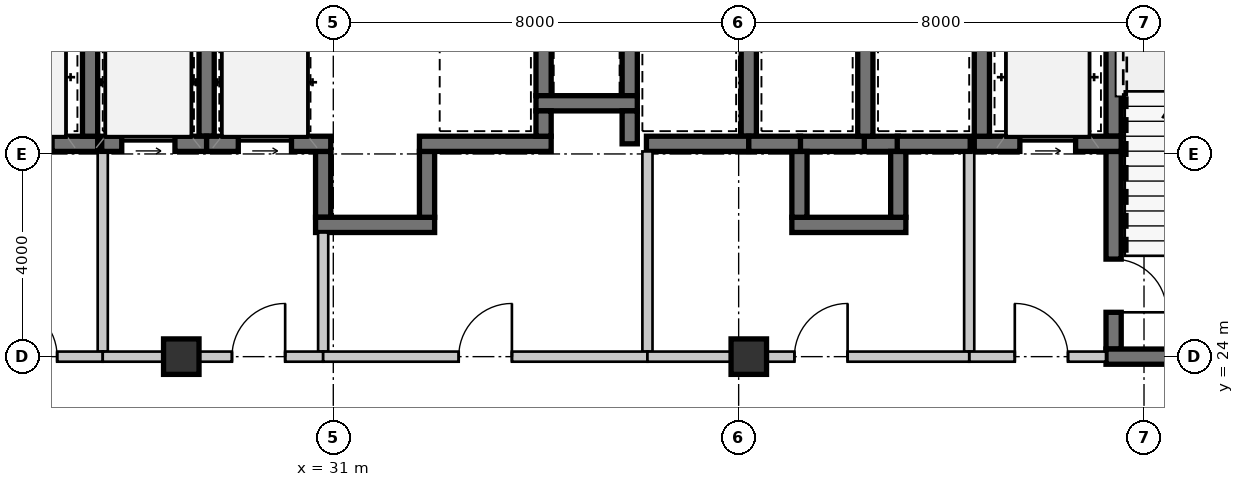
"""IFC4 building model, lengths in metres.
Left out: names, types, materials, properties, quantities, classifications, styles, units other than length and angle.
Written with IfcOpenShell. Run it as: python <this file> out.ifc"""

import sys

from ifc_helpers import new_model, si_unit, direction, frame, frame_2d, origin, origin_2d, place, context, subcontext, project, spatial, rectangle, extrude, source, transform, mapped, element, fill, save


model = new_model("IFC4")
c1 = context("Model", 3, precision=1e-05, world=origin(), true_north=direction((0.0, 1.0)))
c2 = subcontext(c1, "Body", "Model", "MODEL_VIEW")
j1 = project(units=[si_unit("LENGTHUNIT", "METRE"), si_unit("PLANEANGLEUNIT", "RADIAN")], contexts=[c1])
p1 = place(None, origin())
s1 = spatial("IfcSite", under=j1, at=p1, CompositionType="ELEMENT")
p2 = place(p1, origin())
s2 = spatial("IfcBuilding", under=s1, at=p2, CompositionType="ELEMENT")
p3 = place(p2, frame((0.0, 0.0, 68.25)))
s3 = spatial("IfcBuildingStorey", under=s2, at=p3, CompositionType="ELEMENT", Elevation=68.25)
m1 = source(origin(), c2, "Body", "SweptSolid", [
    extrude(rectangle(XDim=0.7, YDim=0.7, at=origin_2d()), origin(), (0.0, 0.0, 1.0), 3.15),
])
for number, where, z_axis, x_axis in (
    (1, (28.0, 24.0, 0.0), (0.0, 0.0, 1.0), (1.0, 0.0, 0.0)),
    (2, (39.2, 24.0, 0.0), (0.0, 0.0, 1.0), (1.0, 0.0, 0.0)),
):
    element("IfcColumn", number, at=place(p3, frame(where, z_axis=z_axis, x_axis=x_axis)), inside=s3, PredefinedType="COLUMN", context=c2, shape_type="MappedRepresentation", body=[
        mapped(m1, transform((0.0, 0.0, 0.0), scale=1.0)),
    ])
m2 = source(origin(), c2, "Body", "SweptSolid", [
    extrude(rectangle(XDim=2.9, YDim=0.3, at=frame_2d((1.45, 0.0))), origin(), (0.0, 0.0, 1.0), 2.93),
])
p4 = place(p3, frame((23.45, 28.2, 0.0), z_axis=(0.0, 0.0, 1.0), x_axis=(1.0, 0.0, 0.0)))
e3 = element("IfcWall", 3, at=p4, inside=s3, PredefinedType="SHEAR", context=c2, shape_type="MappedRepresentation", body=[
    mapped(m2, transform((0.0, 0.0, 0.0), scale=1.0)),
])
m3 = source(origin(), c2, "Body", "SweptSolid", [
    extrude(rectangle(XDim=1.1, YDim=2.15, at=frame_2d((0.55, 1.075))), frame((0.0, 0.16, 0.0), z_axis=(0.0, -1.0, 0.0), x_axis=(1.0, 0.0, 0.0)), (0.0, 0.0, 1.0), 0.32),
])
p5 = place(p4, frame((0.9, 0.0, 0.0)))
e4 = element("IfcOpeningElement", 4, at=p5, cuts=e3, PredefinedType="OPENING", context=c2, shape_type="MappedRepresentation", body=[
    mapped(m3, transform((0.0, 0.0, 0.0), scale=1.0)),
])
m4 = source(origin(), c2, "Body", "SweptSolid", [
    extrude(rectangle(XDim=3.5, YDim=0.3, at=frame_2d((1.75, 0.0))), origin(), (0.0, 0.0, 1.0), 2.93),
])
p6 = place(p3, frame((26.2, 28.35, 0.0), z_axis=(0.0, 0.0, 1.0), x_axis=(0.0, 1.0, 0.0)))
e5 = element("IfcWall", 5, at=p6, inside=s3, PredefinedType="SHEAR", context=c2, shape_type="MappedRepresentation", body=[
    mapped(m4, transform((0.0, 0.0, 0.0), scale=1.0)),
])
m5 = source(origin(), c2, "Body", "SweptSolid", [
    extrude(rectangle(XDim=3.95, YDim=0.2, at=frame_2d((1.975, 0.0))), origin(), (0.0, 0.0, 1.0), 2.93),
])
p7 = place(p3, frame((26.45, 24.1, 0.0), z_axis=(0.0, 0.0, 1.0), x_axis=(0.0, 1.0, 0.0)))
e6 = element("IfcWall", 6, at=p7, inside=s3, PredefinedType="SOLIDWALL", context=c2, shape_type="MappedRepresentation", body=[
    mapped(m5, transform((0.0, 0.0, 0.0), scale=1.0)),
])
m6 = source(origin(), c2, "Body", "SweptSolid", [
    extrude(rectangle(XDim=2.7, YDim=0.2, at=frame_2d((1.35, 0.0))), origin(), (0.0, 0.0, 1.0), 2.47),
])
p8 = place(p3, frame((23.75, 24.0, 0.0), z_axis=(0.0, 0.0, 1.0), x_axis=(1.0, 0.0, 0.0)))
e7 = element("IfcWall", 7, at=p8, inside=s3, PredefinedType="SOLIDWALL", context=c2, shape_type="MappedRepresentation", body=[
    mapped(m6, transform((0.0, 0.0, 0.0), scale=1.0)),
])
m7 = source(origin(), c2, "Body", "SweptSolid", [
    extrude(rectangle(XDim=1.05, YDim=2.1, at=frame_2d((0.525, 1.05))), frame((0.0, 0.11, 0.0), z_axis=(0.0, -1.0, 0.0), x_axis=(1.0, 0.0, 0.0)), (0.0, 0.0, 1.0), 0.22),
])
p9 = place(p8, frame((0.75, 0.0, 0.0)))
e8 = element("IfcOpeningElement", 8, at=p9, cuts=e7, PredefinedType="OPENING", context=c2, shape_type="MappedRepresentation", body=[
    mapped(m7, transform((0.0, 0.0, 0.0), scale=1.0)),
])
p10 = place(p3, frame((46.4, 31.85, 0.0), z_axis=(0.0, 0.0, 1.0), x_axis=(0.0, -1.0, 0.0)))
e9 = element("IfcWall", 9, at=p10, inside=s3, PredefinedType="SHEAR", context=c2, shape_type="MappedRepresentation", body=[
    mapped(m4, transform((0.0, 0.0, 0.0), scale=1.0)),
])
m8 = source(origin(), c2, "Body", "SweptSolid", [
    extrude(rectangle(XDim=3.9, YDim=0.3, at=frame_2d((1.95, 0.0))), origin(), (0.0, 0.0, 1.0), 2.93),
])
p11 = place(p3, frame((46.4, 28.05, 0.0), z_axis=(0.0, 0.0, 1.0), x_axis=(0.0, -1.0, 0.0)))
e10 = element("IfcWall", 10, at=p11, inside=s3, PredefinedType="SHEAR", context=c2, shape_type="MappedRepresentation", body=[
    mapped(m8, transform((0.0, 0.0, 0.0), scale=1.0)),
])
m9 = source(origin(), c2, "Body", "SweptSolid", [
    extrude(rectangle(XDim=1.05, YDim=2.1, at=frame_2d((0.525, 1.05))), frame((0.0, 0.16, 0.0), z_axis=(0.0, -1.0, 0.0), x_axis=(1.0, 0.0, 0.0)), (0.0, 0.0, 1.0), 0.32),
])
p12 = place(p11, frame((2.125, 0.0, 0.0)))
e11 = element("IfcOpeningElement", 11, at=p12, cuts=e10, PredefinedType="OPENING", context=c2, shape_type="MappedRepresentation", body=[
    mapped(m9, transform((0.0, 0.0, 0.0), scale=1.0)),
])
m10 = source(origin(), c2, "Body", "SweptSolid", [
    extrude(rectangle(XDim=4.9, YDim=0.3, at=frame_2d((2.45, 0.0))), origin(), (0.0, 0.0, 1.0), 2.93),
])
p13 = place(p3, frame((46.25, 24.0, 0.0), z_axis=(0.0, 0.0, 1.0), x_axis=(1.0, 0.0, 0.0)))
e12 = element("IfcWall", 12, at=p13, inside=s3, PredefinedType="SHEAR", context=c2, shape_type="MappedRepresentation", body=[
    mapped(m10, transform((0.0, 0.0, 0.0), scale=1.0)),
])
p14 = place(p3, frame((43.65, 28.2, 0.0), z_axis=(0.0, 0.0, 1.0), x_axis=(1.0, 0.0, 0.0)))
e13 = element("IfcWall", 13, at=p14, inside=s3, PredefinedType="SHEAR", context=c2, shape_type="MappedRepresentation", body=[
    mapped(m2, transform((0.0, 0.0, 0.0), scale=1.0)),
])
p15 = place(p14, frame((0.9, 0.0, 0.0)))
e14 = element("IfcOpeningElement", 14, at=p15, cuts=e13, PredefinedType="OPENING", context=c2, shape_type="MappedRepresentation", body=[
    mapped(m3, transform((0.0, 0.0, 0.0), scale=1.0)),
])
p16 = place(p3, frame((43.8, 31.85, 0.0), z_axis=(0.0, 0.0, 1.0), x_axis=(0.0, -1.0, 0.0)))
e15 = element("IfcWall", 15, at=p16, inside=s3, PredefinedType="SHEAR", context=c2, shape_type="MappedRepresentation", body=[
    mapped(m4, transform((0.0, 0.0, 0.0), scale=1.0)),
])
p17 = place(p3, frame((43.55, 28.05, 0.0), z_axis=(0.0, 0.0, 1.0), x_axis=(0.0, -1.0, 0.0)))
e16 = element("IfcWall", 16, at=p17, inside=s3, PredefinedType="SOLIDWALL", context=c2, shape_type="MappedRepresentation", body=[
    mapped(m5, transform((0.0, 0.0, 0.0), scale=1.0)),
])
m11 = source(origin(), c2, "Body", "SweptSolid", [
    extrude(rectangle(XDim=2.7, YDim=0.2, at=frame_2d((1.35, 0.0))), origin(), (0.0, 0.0, 1.0), 2.397),
])
p18 = place(p3, frame((43.55, 24.0, 0.0), z_axis=(0.0, 0.0, 1.0), x_axis=(1.0, 0.0, 0.0)))
e17 = element("IfcWall", 17, at=p18, inside=s3, PredefinedType="SOLIDWALL", context=c2, shape_type="MappedRepresentation", body=[
    mapped(m11, transform((0.0, 0.0, 0.0), scale=1.0)),
])
p19 = place(p18, frame((0.9, 0.0, 0.0)))
e18 = element("IfcOpeningElement", 18, at=p19, cuts=e17, PredefinedType="OPENING", context=c2, shape_type="MappedRepresentation", body=[
    mapped(m7, transform((0.0, 0.0, 0.0), scale=1.0)),
])
m12 = source(origin(), c2, "Body", "SweptSolid", [
    extrude(rectangle(XDim=1.2, YDim=0.3, at=frame_2d((0.6, 0.0))), origin(), (0.0, 0.0, 1.0), 2.93),
])
for number, where, z_axis, x_axis in (
    (19, (35.15, 30.35, 0.0), (0.0, 0.0, 1.0), (0.0, -1.0, 0.0)),
    (20, (36.85, 29.15, 0.0), (0.0, 0.0, 1.0), (0.0, 1.0, 0.0)),
):
    element("IfcWall", number, at=place(p3, frame(where, z_axis=z_axis, x_axis=x_axis)), inside=s3, PredefinedType="SHEAR", context=c2, shape_type="MappedRepresentation", body=[
        mapped(m12, transform((0.0, 0.0, 0.0), scale=1.0)),
    ])
m13 = source(origin(), c2, "Body", "SweptSolid", [
    extrude(rectangle(XDim=2.0, YDim=0.3, at=frame_2d((1.0, 0.0))), origin(), (0.0, 0.0, 1.0), 2.93),
])
p20 = place(p3, frame((35.0, 29.0, 0.0), z_axis=(0.0, 0.0, 1.0), x_axis=(1.0, 0.0, 0.0)))
e21 = element("IfcWall", 21, at=p20, inside=s3, PredefinedType="SHEAR", context=c2, shape_type="MappedRepresentation", body=[
    mapped(m13, transform((0.0, 0.0, 0.0), scale=1.0)),
])
m14 = source(origin(), c2, "Body", "SweptSolid", [
    extrude(rectangle(XDim=1.3, YDim=0.3, at=frame_2d((0.65, 0.0))), origin(), (0.0, 0.0, 1.0), 2.93),
])
p21 = place(p3, frame((30.8, 28.05, 0.0), z_axis=(0.0, 0.0, 1.0), x_axis=(0.0, -1.0, 0.0)))
e22 = element("IfcWall", 22, at=p21, inside=s3, PredefinedType="SHEAR", context=c2, shape_type="MappedRepresentation", body=[
    mapped(m14, transform((0.0, 0.0, 0.0), scale=1.0)),
])
m15 = source(origin(), c2, "Body", "SweptSolid", [
    extrude(rectangle(XDim=2.35, YDim=0.3, at=frame_2d((1.175, 0.0))), origin(), (0.0, 0.0, 1.0), 2.93),
])
p22 = place(p3, frame((30.65, 26.6, 0.0), z_axis=(0.0, 0.0, 1.0), x_axis=(1.0, 0.0, 0.0)))
e23 = element("IfcWall", 23, at=p22, inside=s3, PredefinedType="SHEAR", context=c2, shape_type="MappedRepresentation", body=[
    mapped(m15, transform((0.0, 0.0, 0.0), scale=1.0)),
])
p23 = place(p3, frame((32.85, 26.75, 0.0), z_axis=(0.0, 0.0, 1.0), x_axis=(0.0, 1.0, 0.0)))
e24 = element("IfcWall", 24, at=p23, inside=s3, PredefinedType="SHEAR", context=c2, shape_type="MappedRepresentation", body=[
    mapped(m14, transform((0.0, 0.0, 0.0), scale=1.0)),
])
m16 = source(origin(), c2, "Body", "SweptSolid", [
    extrude(rectangle(XDim=1.32, YDim=0.3, at=frame_2d((0.66, 0.0))), origin(), (0.0, 0.0, 1.0), 2.93),
])
p24 = place(p3, frame((41.52, 28.2, 0.0), z_axis=(0.0, 0.0, 1.0), x_axis=(-1.0, 0.0, 0.0)))
e25 = element("IfcWall", 25, at=p24, inside=s3, PredefinedType="SHEAR", context=c2, shape_type="MappedRepresentation", body=[
    mapped(m16, transform((0.0, 0.0, 0.0), scale=1.0)),
])
m17 = source(origin(), c2, "Body", "SweptSolid", [
    extrude(rectangle(XDim=0.67, YDim=0.3, at=frame_2d((0.335, 0.0))), origin(), (0.0, 0.0, 1.0), 2.93),
])
p25 = place(p3, frame((42.15, 28.2, 0.0), z_axis=(0.0, 0.0, 1.0), x_axis=(-1.0, 0.0, 0.0)))
e26 = element("IfcWall", 26, at=p25, inside=s3, PredefinedType="SHEAR", context=c2, shape_type="MappedRepresentation", body=[
    mapped(m17, transform((0.0, 0.0, 0.0), scale=1.0)),
])
m18 = source(origin(), c2, "Body", "SweptSolid", [
    extrude(rectangle(XDim=2.25, YDim=0.3, at=frame_2d((1.125, 0.0))), origin(), (0.0, 0.0, 1.0), 2.93),
])
p26 = place(p3, frame((40.05, 26.6, 0.0), z_axis=(0.0, 0.0, 1.0), x_axis=(1.0, 0.0, 0.0)))
e27 = element("IfcWall", 27, at=p26, inside=s3, PredefinedType="SHEAR", context=c2, shape_type="MappedRepresentation", body=[
    mapped(m18, transform((0.0, 0.0, 0.0), scale=1.0)),
])
for number, where, z_axis, x_axis in (
    (28, (40.2, 28.05, 0.0), (0.0, 0.0, 1.0), (0.0, -1.0, 0.0)),
    (29, (42.15, 26.75, 0.0), (0.0, 0.0, 1.0), (0.0, 1.0, 0.0)),
):
    element("IfcWall", number, at=place(p3, frame(where, z_axis=z_axis, x_axis=x_axis)), inside=s3, PredefinedType="SHEAR", context=c2, shape_type="MappedRepresentation", body=[
        mapped(m14, transform((0.0, 0.0, 0.0), scale=1.0)),
    ])
p27 = place(p3, frame((28.5, 28.35, 0.0), z_axis=(0.0, 0.0, 1.0), x_axis=(0.0, 1.0, 0.0)))
e30 = element("IfcWall", 30, at=p27, inside=s3, PredefinedType="SHEAR", context=c2, shape_type="MappedRepresentation", body=[
    mapped(m4, transform((0.0, 0.0, 0.0), scale=1.0)),
])
m19 = source(origin(), c2, "Body", "SweptSolid", [
    extrude(rectangle(XDim=2.07, YDim=0.3, at=frame_2d((1.035, 0.0))), origin(), (0.0, 0.0, 1.0), 2.93),
])
p28 = place(p3, frame((26.43, 28.2, 0.0), z_axis=(0.0, 0.0, 1.0), x_axis=(1.0, 0.0, 0.0)))
e31 = element("IfcWall", 31, at=p28, inside=s3, PredefinedType="SHEAR", context=c2, shape_type="MappedRepresentation", body=[
    mapped(m19, transform((0.0, 0.0, 0.0), scale=1.0)),
])
m20 = source(origin(), c2, "Body", "SweptSolid", [
    extrude(rectangle(XDim=1.05, YDim=2.15, at=frame_2d((0.525, 1.075))), frame((0.0, 0.16, 0.0), z_axis=(0.0, -1.0, 0.0), x_axis=(1.0, 0.0, 0.0)), (0.0, 0.0, 1.0), 0.32),
])
p29 = place(p28, frame((0.395, 0.0, 0.0)))
e32 = element("IfcOpeningElement", 32, at=p29, cuts=e31, PredefinedType="OPENING", context=c2, shape_type="MappedRepresentation", body=[
    mapped(m20, transform((0.0, 0.0, 0.0), scale=1.0)),
])
m21 = source(origin(), c2, "Body", "SweptSolid", [
    extrude(rectangle(XDim=2.45, YDim=0.3, at=frame_2d((1.225, 0.0))), origin(), (0.0, 0.0, 1.0), 2.93),
])
p30 = place(p3, frame((28.5, 28.2, 0.0), z_axis=(0.0, 0.0, 1.0), x_axis=(1.0, 0.0, 0.0)))
e33 = element("IfcWall", 33, at=p30, inside=s3, PredefinedType="SHEAR", context=c2, shape_type="MappedRepresentation", body=[
    mapped(m21, transform((0.0, 0.0, 0.0), scale=1.0)),
])
p31 = place(p30, frame((0.625, 0.0, 0.0)))
e34 = element("IfcOpeningElement", 34, at=p31, cuts=e33, PredefinedType="OPENING", context=c2, shape_type="MappedRepresentation", body=[
    mapped(m20, transform((0.0, 0.0, 0.0), scale=1.0)),
])
m22 = source(origin(), c2, "Body", "SweptSolid", [
    extrude(rectangle(XDim=2.35, YDim=0.2, at=frame_2d((1.175, 0.0))), origin(), (0.0, 0.0, 1.0), 2.93),
])
p32 = place(p3, frame((30.8, 26.45, 0.0), z_axis=(0.0, 0.0, 1.0), x_axis=(0.0, -1.0, 0.0)))
e35 = element("IfcWall", 35, at=p32, inside=s3, PredefinedType="SOLIDWALL", context=c2, shape_type="MappedRepresentation", body=[
    mapped(m22, transform((0.0, 0.0, 0.0), scale=1.0)),
])
m23 = source(origin(), c2, "Body", "SweptSolid", [
    extrude(rectangle(XDim=4.35, YDim=0.2, at=frame_2d((2.175, 0.0))), origin(), (0.0, 0.0, 1.0), 2.47),
])
p33 = place(p3, frame((30.8, 24.0, 0.0), z_axis=(0.0, 0.0, 1.0), x_axis=(-1.0, 0.0, 0.0)))
e36 = element("IfcWall", 36, at=p33, inside=s3, PredefinedType="SOLIDWALL", context=c2, shape_type="MappedRepresentation", body=[
    mapped(m23, transform((0.0, 0.0, 0.0), scale=1.0)),
])
p34 = place(p33, frame((0.75, 0.0, 0.0)))
e37 = element("IfcOpeningElement", 37, at=p34, cuts=e36, PredefinedType="OPENING", context=c2, shape_type="MappedRepresentation", body=[
    mapped(m7, transform((0.0, 0.0, 0.0), scale=1.0)),
])
m24 = source(origin(), c2, "Body", "SweptSolid", [
    extrude(rectangle(XDim=2.6, YDim=0.3, at=frame_2d((1.3, 0.0))), origin(), (0.0, 0.0, 1.0), 2.93),
])
p35 = place(p3, frame((32.7, 28.2, 0.0), z_axis=(0.0, 0.0, 1.0), x_axis=(1.0, 0.0, 0.0)))
e38 = element("IfcWall", 38, at=p35, inside=s3, PredefinedType="SHEAR", context=c2, shape_type="MappedRepresentation", body=[
    mapped(m24, transform((0.0, 0.0, 0.0), scale=1.0)),
])
m25 = source(origin(), c2, "Body", "SweptSolid", [
    extrude(rectangle(XDim=0.5, YDim=0.3, at=frame_2d((0.25, 0.0))), origin(), (0.0, 0.0, 1.0), 2.93),
])
p36 = place(p3, frame((35.15, 28.35, 0.0), z_axis=(0.0, 0.0, 1.0), x_axis=(0.0, 1.0, 0.0)))
e39 = element("IfcWall", 39, at=p36, inside=s3, PredefinedType="SHEAR", context=c2, shape_type="MappedRepresentation", body=[
    mapped(m25, transform((0.0, 0.0, 0.0), scale=1.0)),
])
p37 = place(p3, frame((39.2, 28.35, 0.0), z_axis=(0.0, 0.0, 1.0), x_axis=(0.0, 1.0, 0.0)))
e40 = element("IfcWall", 40, at=p37, inside=s3, PredefinedType="SHEAR", context=c2, shape_type="MappedRepresentation", body=[
    mapped(m4, transform((0.0, 0.0, 0.0), scale=1.0)),
])
m26 = source(origin(), c2, "Body", "SweptSolid", [
    extrude(rectangle(XDim=0.65, YDim=0.3, at=frame_2d((0.325, 0.0))), origin(), (0.0, 0.0, 1.0), 2.93),
])
p38 = place(p3, frame((36.85, 28.85, 0.0), z_axis=(0.0, 0.0, 1.0), x_axis=(0.0, -1.0, 0.0)))
e41 = element("IfcWall", 41, at=p38, inside=s3, PredefinedType="SHEAR", context=c2, shape_type="MappedRepresentation", body=[
    mapped(m26, transform((0.0, 0.0, 0.0), scale=1.0)),
])
m27 = source(origin(), c2, "Body", "SweptSolid", [
    extrude(rectangle(XDim=2.02, YDim=0.3, at=frame_2d((1.01, 0.0))), origin(), (0.0, 0.0, 1.0), 2.93),
])
p39 = place(p3, frame((37.18, 28.2, 0.0), z_axis=(0.0, 0.0, 1.0), x_axis=(1.0, 0.0, 0.0)))
e42 = element("IfcWall", 42, at=p39, inside=s3, PredefinedType="SHEAR", context=c2, shape_type="MappedRepresentation", body=[
    mapped(m27, transform((0.0, 0.0, 0.0), scale=1.0)),
])
p40 = place(p3, frame((41.5, 28.35, 0.0), z_axis=(0.0, 0.0, 1.0), x_axis=(0.0, 1.0, 0.0)))
e43 = element("IfcWall", 43, at=p40, inside=s3, PredefinedType="SHEAR", context=c2, shape_type="MappedRepresentation", body=[
    mapped(m4, transform((0.0, 0.0, 0.0), scale=1.0)),
])
m28 = source(origin(), c2, "Body", "SweptSolid", [
    extrude(rectangle(XDim=1.02, YDim=0.3, at=frame_2d((0.51, 0.0))), origin(), (0.0, 0.0, 1.0), 2.93),
])
p41 = place(p3, frame((39.2, 28.2, 0.0), z_axis=(0.0, 0.0, 1.0), x_axis=(1.0, 0.0, 0.0)))
e44 = element("IfcWall", 44, at=p41, inside=s3, PredefinedType="SHEAR", context=c2, shape_type="MappedRepresentation", body=[
    mapped(m28, transform((0.0, 0.0, 0.0), scale=1.0)),
])
m29 = source(origin(), c2, "Body", "SweptSolid", [
    extrude(rectangle(XDim=1.44, YDim=0.3, at=frame_2d((0.72, 0.0))), origin(), (0.0, 0.0, 1.0), 2.93),
])
p42 = place(p3, frame((42.13, 28.2, 0.0), z_axis=(0.0, 0.0, 1.0), x_axis=(1.0, 0.0, 0.0)))
e45 = element("IfcWall", 45, at=p42, inside=s3, PredefinedType="SHEAR", context=c2, shape_type="MappedRepresentation", body=[
    mapped(m29, transform((0.0, 0.0, 0.0), scale=1.0)),
])
p43 = place(p3, frame((37.2, 28.05, 0.0), z_axis=(0.0, 0.0, 1.0), x_axis=(0.0, -1.0, 0.0)))
e46 = element("IfcWall", 46, at=p43, inside=s3, PredefinedType="SOLIDWALL", context=c2, shape_type="MappedRepresentation", body=[
    mapped(m5, transform((0.0, 0.0, 0.0), scale=1.0)),
])
m30 = source(origin(), c2, "Body", "SweptSolid", [
    extrude(rectangle(XDim=6.4, YDim=0.2, at=frame_2d((3.2, 0.0))), origin(), (0.0, 0.0, 1.0), 2.47),
])
p44 = place(p3, frame((37.2, 24.0, 0.0), z_axis=(0.0, 0.0, 1.0), x_axis=(-1.0, 0.0, 0.0)))
e47 = element("IfcWall", 47, at=p44, inside=s3, PredefinedType="SOLIDWALL", context=c2, shape_type="MappedRepresentation", body=[
    mapped(m30, transform((0.0, 0.0, 0.0), scale=1.0)),
])
p45 = place(p44, frame((2.675, 0.0, 0.0)))
e48 = element("IfcOpeningElement", 48, at=p45, cuts=e47, PredefinedType="OPENING", context=c2, shape_type="MappedRepresentation", body=[
    mapped(m7, transform((0.0, 0.0, 0.0), scale=1.0)),
])
m31 = source(origin(), c2, "Body", "SweptSolid", [
    extrude(rectangle(XDim=4.35, YDim=0.2, at=frame_2d((2.175, 0.0))), origin(), (0.0, 0.0, 1.0), 2.397),
])
p46 = place(p3, frame((43.55, 24.0, 0.0), z_axis=(0.0, 0.0, 1.0), x_axis=(-1.0, 0.0, 0.0)))
e49 = element("IfcWall", 49, at=p46, inside=s3, PredefinedType="SOLIDWALL", context=c2, shape_type="MappedRepresentation", body=[
    mapped(m31, transform((0.0, 0.0, 0.0), scale=1.0)),
])
p47 = place(p46, frame((2.4, 0.0, 0.0)))
e50 = element("IfcOpeningElement", 50, at=p47, cuts=e49, PredefinedType="OPENING", context=c2, shape_type="MappedRepresentation", body=[
    mapped(m7, transform((0.0, 0.0, 0.0), scale=1.0)),
])
m32 = source(origin(), c2, "Body", "SweptSolid", [
    extrude(rectangle(XDim=2.0, YDim=0.2, at=frame_2d((1.0, 0.0))), origin(), (0.0, 0.0, 1.0), 2.47),
])
p48 = place(p3, frame((39.2, 24.0, 0.0), z_axis=(0.0, 0.0, 1.0), x_axis=(-1.0, 0.0, 0.0)))
e51 = element("IfcWall", 51, at=p48, inside=s3, PredefinedType="SOLIDWALL", context=c2, shape_type="MappedRepresentation", body=[
    mapped(m32, transform((0.0, 0.0, 0.0), scale=1.0)),
])
m33 = source(origin(), c2, "Body", "SweptSolid", [
    extrude(rectangle(XDim=1.05, YDim=2.1, at=frame_2d((0.525, 1.05))), frame((0.0, 0.025, 0.0), z_axis=(0.0, -1.0, 0.0), x_axis=(1.0, 0.0, 0.0)), (0.0, 0.0, 1.0), 0.05),
])
p49 = place(p9, origin())
e52 = element("IfcDoor", 52, at=p49, inside=s3, OperationType="SINGLE_SWING_LEFT", PredefinedType="DOOR", context=c2, shape_type="MappedRepresentation", body=[
    mapped(m33, transform((0.0, 0.0, 0.0), scale=1.0)),
])
fill(e8, e52)
p50 = place(p12, origin())
e53 = element("IfcDoor", 53, at=p50, inside=s3, OperationType="SINGLE_SWING_RIGHT", PredefinedType="DOOR", context=c2, shape_type="MappedRepresentation", body=[
    mapped(m33, transform((0.0, 0.0, 0.0), scale=1.0)),
])
fill(e11, e53)
m34 = source(origin(), c2, "Body", "SweptSolid", [
    extrude(rectangle(XDim=1.1, YDim=2.15, at=frame_2d((0.55, 1.075))), frame((0.0, 0.025, 0.0), z_axis=(0.0, -1.0, 0.0), x_axis=(1.0, 0.0, 0.0)), (0.0, 0.0, 1.0), 0.05),
])
p51 = place(p15, origin())
e54 = element("IfcDoor", 54, at=p51, inside=s3, OperationType="SLIDING_TO_LEFT", PredefinedType="DOOR", context=c2, shape_type="MappedRepresentation", body=[
    mapped(m34, transform((0.0, 0.0, 0.0), scale=1.0)),
])
fill(e14, e54)
p52 = place(p19, origin())
e55 = element("IfcDoor", 55, at=p52, inside=s3, OperationType="SINGLE_SWING_LEFT", PredefinedType="DOOR", context=c2, shape_type="MappedRepresentation", body=[
    mapped(m33, transform((0.0, 0.0, 0.0), scale=1.0)),
])
fill(e18, e55)
m35 = source(origin(), c2, "Body", "SweptSolid", [
    extrude(rectangle(XDim=1.05, YDim=2.15, at=frame_2d((0.525, 1.075))), frame((0.0, 0.025, 0.0), z_axis=(0.0, -1.0, 0.0), x_axis=(1.0, 0.0, 0.0)), (0.0, 0.0, 1.0), 0.05),
])
p53 = place(p29, origin())
e56 = element("IfcDoor", 56, at=p53, inside=s3, OperationType="SLIDING_TO_LEFT", PredefinedType="DOOR", context=c2, shape_type="MappedRepresentation", body=[
    mapped(m35, transform((0.0, 0.0, 0.0), scale=1.0)),
])
fill(e32, e56)
p54 = place(p31, origin())
e57 = element("IfcDoor", 57, at=p54, inside=s3, OperationType="SLIDING_TO_LEFT", PredefinedType="DOOR", context=c2, shape_type="MappedRepresentation", body=[
    mapped(m35, transform((0.0, 0.0, 0.0), scale=1.0)),
])
fill(e34, e57)
p55 = place(p34, frame((1.05, 0.0, 0.0), z_axis=(0.0, 0.0, 1.0), x_axis=(-1.0, 0.0, 0.0)))
e58 = element("IfcDoor", 58, at=p55, inside=s3, OperationType="SINGLE_SWING_RIGHT", PredefinedType="DOOR", context=c2, shape_type="MappedRepresentation", body=[
    mapped(m33, transform((0.0, 0.0, 0.0), scale=1.0)),
])
fill(e37, e58)
p56 = place(p45, frame((1.05, 0.0, 0.0), z_axis=(0.0, 0.0, 1.0), x_axis=(-1.0, 0.0, 0.0)))
e59 = element("IfcDoor", 59, at=p56, inside=s3, OperationType="SINGLE_SWING_RIGHT", PredefinedType="DOOR", context=c2, shape_type="MappedRepresentation", body=[
    mapped(m33, transform((0.0, 0.0, 0.0), scale=1.0)),
])
fill(e48, e59)
p57 = place(p47, frame((1.05, 0.0, 0.0), z_axis=(0.0, 0.0, 1.0), x_axis=(-1.0, 0.0, 0.0)))
e60 = element("IfcDoor", 60, at=p57, inside=s3, OperationType="SINGLE_SWING_RIGHT", PredefinedType="DOOR", context=c2, shape_type="MappedRepresentation", body=[
    mapped(m33, transform((0.0, 0.0, 0.0), scale=1.0)),
])
fill(e50, e60)
save(model, sys.argv[1])
